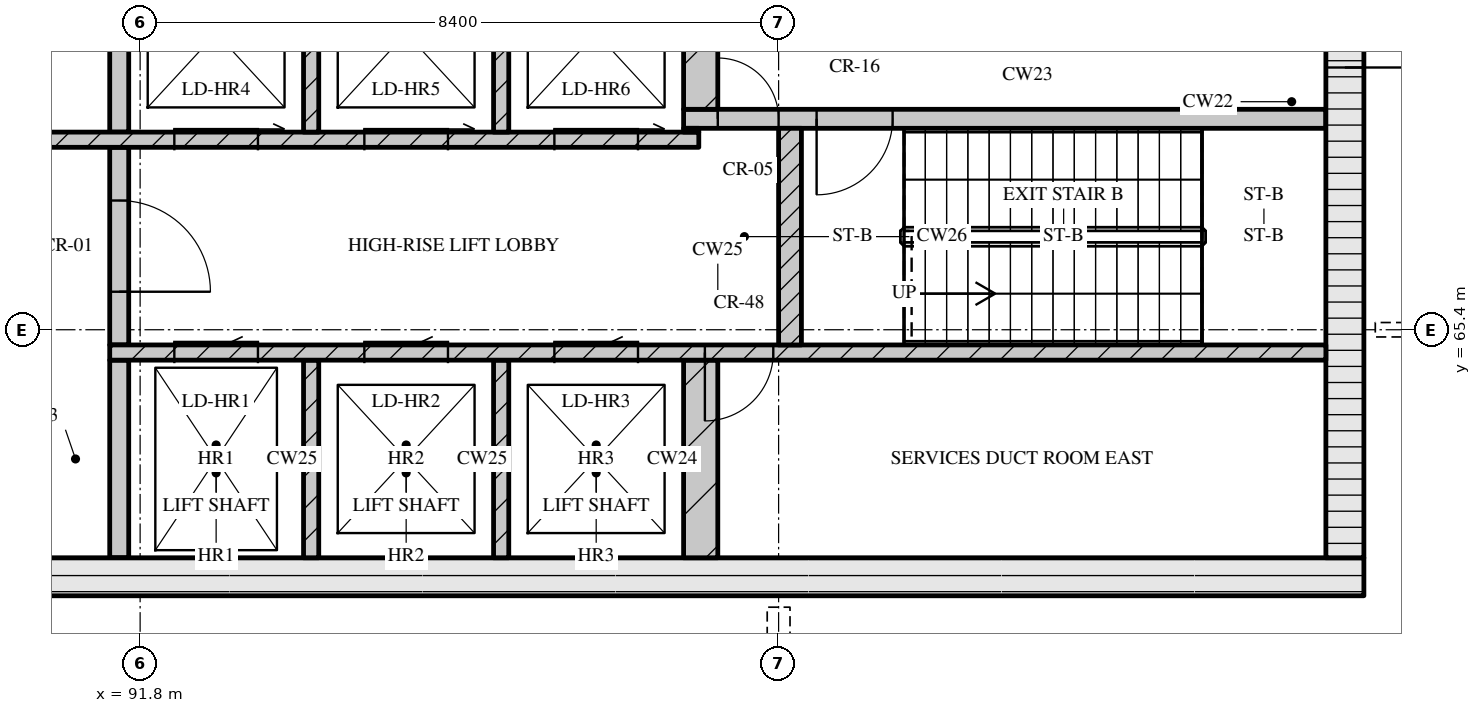
"""IFC4 building model, lengths in metres.
Left out: names, types, materials, properties, quantities, classifications, styles, units other than length and angle.
Written with IfcOpenShell. Run it as: python <this file> out.ifc"""

import sys

from ifc_helpers import new_model, si_unit, direction, frame, frame_2d, origin, place, context, subcontext, project, spatial, rectangle, extrude, element, fill, save


model = new_model("IFC4")
c1 = context("Model", 3, precision=1e-05, world=origin(), true_north=direction((0.0, 1.0)))
c2 = subcontext(c1, "Body", "Model", "MODEL_VIEW")
j1 = project(units=[si_unit("LENGTHUNIT", "METRE"), si_unit("PLANEANGLEUNIT", "RADIAN")], contexts=[c1])
p1 = place(None, origin())
s1 = spatial("IfcSite", under=j1, at=p1, CompositionType="ELEMENT")
p2 = place(p1, origin())
s2 = spatial("IfcBuilding", under=s1, at=p2, CompositionType="ELEMENT")
p3 = place(p2, frame((0.0, 0.0, 252.3)))
s3 = spatial("IfcBuildingStorey", under=s2, at=p3, CompositionType="ELEMENT", Elevation=252.3)
p4 = place(p3, frame((67.3, 62.15, 0.0), z_axis=(0.0, 0.0, 1.0), x_axis=(1.0, 0.0, 0.0)))
e1 = element("IfcWall", 1, at=p4, inside=s3, PredefinedType="SOLIDWALL", context=c2, shape_type="SweptSolid", body=[
    extrude(rectangle(XDim=40.6, YDim=0.5, at=frame_2d((20.3, 0.0))), origin(), (0.0, 0.0, 1.0), 10.97),
])
p5 = place(p4, frame((20.65, 0.0, 0.0)))
e2 = element("IfcOpeningElement", 2, at=p5, cuts=e1, PredefinedType="OPENING", context=c2, shape_type="SweptSolid", body=[
    extrude(rectangle(XDim=1.8, YDim=2.1, at=frame_2d((0.9, 1.05))), frame((0.0, 0.26, 0.0), z_axis=(0.0, -1.0, 0.0), x_axis=(1.0, 0.0, 0.0)), (0.0, 0.0, 1.0), 0.52),
])
p6 = place(p3, frame((107.65, 62.4, 0.0), z_axis=(0.0, 0.0, 1.0), x_axis=(0.0, 1.0, 0.0)))
e3 = element("IfcWall", 3, at=p6, inside=s3, PredefinedType="SOLIDWALL", context=c2, shape_type="SweptSolid", body=[
    extrude(rectangle(XDim=12.0, YDim=0.5, at=frame_2d((6.0, 0.0))), origin(), (0.0, 0.0, 1.0), 10.97),
])
p7 = place(p6, frame((6.45, 0.0, 0.0)))
e4 = element("IfcOpeningElement", 4, at=p7, cuts=e3, PredefinedType="OPENING", context=c2, shape_type="SweptSolid", body=[
    extrude(rectangle(XDim=1.2, YDim=2.1, at=frame_2d((0.6, 1.05))), frame((0.0, 0.26, 0.0), z_axis=(0.0, -1.0, 0.0), x_axis=(1.0, 0.0, 0.0)), (0.0, 0.0, 1.0), 0.52),
])
p8 = place(p3, frame((91.525, 62.4, 0.0), z_axis=(0.0, 0.0, 1.0), x_axis=(0.0, 1.0, 0.0)))
e5 = element("IfcWall", 5, at=p8, inside=s3, PredefinedType="SOLIDWALL", context=c2, shape_type="SweptSolid", body=[
    extrude(rectangle(XDim=2.6, YDim=0.25, at=frame_2d((1.3, 0.0))), origin(), (0.0, 0.0, 1.0), 10.97),
])
for number, where, z_axis, x_axis in (
    (6, (94.05, 62.4, 0.0), (0.0, 0.0, 1.0), (0.0, 1.0, 0.0)),
    (7, (96.55, 62.4, 0.0), (0.0, 0.0, 1.0), (0.0, 1.0, 0.0)),
):
    element("IfcWall", number, at=place(p3, frame(where, z_axis=z_axis, x_axis=x_axis)), inside=s3, PredefinedType="SOLIDWALL", context=c2, shape_type="SweptSolid", body=[
        extrude(rectangle(XDim=2.6, YDim=0.2, at=frame_2d((1.3, 0.0))), origin(), (0.0, 0.0, 1.0), 10.97),
    ])
p9 = place(p3, frame((99.175, 62.4, 0.0), z_axis=(0.0, 0.0, 1.0), x_axis=(0.0, 1.0, 0.0)))
e8 = element("IfcWall", 8, at=p9, inside=s3, PredefinedType="SOLIDWALL", context=c2, shape_type="SweptSolid", body=[
    extrude(rectangle(XDim=2.6, YDim=0.45, at=frame_2d((1.3, 0.0))), origin(), (0.0, 0.0, 1.0), 10.97),
])
p10 = place(p3, frame((91.4, 65.1, 0.0), z_axis=(0.0, 0.0, 1.0), x_axis=(1.0, 0.0, 0.0)))
e9 = element("IfcWall", 9, at=p10, inside=s3, PredefinedType="SOLIDWALL", context=c2, shape_type="SweptSolid", body=[
    extrude(rectangle(XDim=16.0, YDim=0.2, at=frame_2d((8.0, 0.0))), origin(), (0.0, 0.0, 1.0), 10.97),
])
p11 = place(p10, frame((0.85, 0.0, 0.0)))
e10 = element("IfcOpeningElement", 10, at=p11, cuts=e9, PredefinedType="OPENING", context=c2, shape_type="SweptSolid", body=[
    extrude(rectangle(XDim=1.1, YDim=2.1, at=frame_2d((0.55, 1.05))), frame((0.0, 0.11, 0.0), z_axis=(0.0, -1.0, 0.0), x_axis=(1.0, 0.0, 0.0)), (0.0, 0.0, 1.0), 0.22),
])
p12 = place(p10, frame((3.35, 0.0, 0.0)))
e11 = element("IfcOpeningElement", 11, at=p12, cuts=e9, PredefinedType="OPENING", context=c2, shape_type="SweptSolid", body=[
    extrude(rectangle(XDim=1.1, YDim=2.1, at=frame_2d((0.55, 1.05))), frame((0.0, 0.11, 0.0), z_axis=(0.0, -1.0, 0.0), x_axis=(1.0, 0.0, 0.0)), (0.0, 0.0, 1.0), 0.22),
])
p13 = place(p10, frame((5.85, 0.0, 0.0)))
e12 = element("IfcOpeningElement", 12, at=p13, cuts=e9, PredefinedType="OPENING", context=c2, shape_type="SweptSolid", body=[
    extrude(rectangle(XDim=1.1, YDim=2.1, at=frame_2d((0.55, 1.05))), frame((0.0, 0.11, 0.0), z_axis=(0.0, -1.0, 0.0), x_axis=(1.0, 0.0, 0.0)), (0.0, 0.0, 1.0), 0.22),
])
p14 = place(p10, frame((7.83, 0.0, 0.0)))
e13 = element("IfcOpeningElement", 13, at=p14, cuts=e9, PredefinedType="OPENING", context=c2, shape_type="SweptSolid", body=[
    extrude(rectangle(XDim=0.9, YDim=2.1, at=frame_2d((0.45, 1.05))), frame((0.0, 0.11, 0.0), z_axis=(0.0, -1.0, 0.0), x_axis=(1.0, 0.0, 0.0)), (0.0, 0.0, 1.0), 0.22),
])
p15 = place(p3, frame((91.525, 65.2, 0.0), z_axis=(0.0, 0.0, 1.0), x_axis=(0.0, 1.0, 0.0)))
e14 = element("IfcWall", 14, at=p15, inside=s3, PredefinedType="SOLIDWALL", context=c2, shape_type="SweptSolid", body=[
    extrude(rectangle(XDim=2.6, YDim=0.25, at=frame_2d((1.3, 0.0))), origin(), (0.0, 0.0, 1.0), 10.97),
])
p16 = place(p15, frame((0.7, 0.0, 0.0)))
e15 = element("IfcOpeningElement", 15, at=p16, cuts=e14, PredefinedType="OPENING", context=c2, shape_type="SweptSolid", body=[
    extrude(rectangle(XDim=1.2, YDim=2.1, at=frame_2d((0.6, 1.05))), frame((0.0, 0.135, 0.0), z_axis=(0.0, -1.0, 0.0), x_axis=(1.0, 0.0, 0.0)), (0.0, 0.0, 1.0), 0.27),
])
p17 = place(p3, frame((100.35, 65.2, 0.0), z_axis=(0.0, 0.0, 1.0), x_axis=(0.0, 1.0, 0.0)))
e16 = element("IfcWall", 16, at=p17, inside=s3, PredefinedType="SOLIDWALL", context=c2, shape_type="SweptSolid", body=[
    extrude(rectangle(XDim=2.85, YDim=0.3, at=frame_2d((1.425, 0.0))), origin(), (0.0, 0.0, 1.0), 10.97),
])
p18 = place(p3, frame((76.05, 67.9, 0.0), z_axis=(0.0, 0.0, 1.0), x_axis=(1.0, 0.0, 0.0)))
e17 = element("IfcWall", 17, at=p18, inside=s3, PredefinedType="SOLIDWALL", context=c2, shape_type="SweptSolid", body=[
    extrude(rectangle(XDim=23.1, YDim=0.2, at=frame_2d((11.55, 0.0))), origin(), (0.0, 0.0, 1.0), 10.97),
])
p19 = place(p18, frame((0.75, 0.0, 0.0)))
e18 = element("IfcOpeningElement", 18, at=p19, cuts=e17, PredefinedType="OPENING", context=c2, shape_type="SweptSolid", body=[
    extrude(rectangle(XDim=0.9, YDim=2.1, at=frame_2d((0.45, 1.05))), frame((0.0, 0.11, 0.0), z_axis=(0.0, -1.0, 0.0), x_axis=(1.0, 0.0, 0.0)), (0.0, 0.0, 1.0), 0.22),
])
p20 = place(p18, frame((3.32, 0.0, 0.0)))
e19 = element("IfcOpeningElement", 19, at=p20, cuts=e17, PredefinedType="OPENING", context=c2, shape_type="SweptSolid", body=[
    extrude(rectangle(XDim=0.9, YDim=2.1, at=frame_2d((0.45, 1.05))), frame((0.0, 0.11, 0.0), z_axis=(0.0, -1.0, 0.0), x_axis=(1.0, 0.0, 0.0)), (0.0, 0.0, 1.0), 0.22),
])
p21 = place(p18, frame((5.77, 0.0, 0.0)))
e20 = element("IfcOpeningElement", 20, at=p21, cuts=e17, PredefinedType="OPENING", context=c2, shape_type="SweptSolid", body=[
    extrude(rectangle(XDim=0.9, YDim=2.1, at=frame_2d((0.45, 1.05))), frame((0.0, 0.11, 0.0), z_axis=(0.0, -1.0, 0.0), x_axis=(1.0, 0.0, 0.0)), (0.0, 0.0, 1.0), 0.22),
])
p22 = place(p18, frame((8.45, 0.0, 0.0)))
e21 = element("IfcOpeningElement", 21, at=p22, cuts=e17, PredefinedType="OPENING", context=c2, shape_type="SweptSolid", body=[
    extrude(rectangle(XDim=0.9, YDim=2.1, at=frame_2d((0.45, 1.05))), frame((0.0, 0.11, 0.0), z_axis=(0.0, -1.0, 0.0), x_axis=(1.0, 0.0, 0.0)), (0.0, 0.0, 1.0), 0.22),
])
p23 = place(p18, frame((10.91, 0.0, 0.0)))
e22 = element("IfcOpeningElement", 22, at=p23, cuts=e17, PredefinedType="OPENING", context=c2, shape_type="SweptSolid", body=[
    extrude(rectangle(XDim=0.9, YDim=2.1, at=frame_2d((0.45, 1.05))), frame((0.0, 0.11, 0.0), z_axis=(0.0, -1.0, 0.0), x_axis=(1.0, 0.0, 0.0)), (0.0, 0.0, 1.0), 0.22),
])
p24 = place(p18, frame((13.55, 0.0, 0.0)))
e23 = element("IfcOpeningElement", 23, at=p24, cuts=e17, PredefinedType="OPENING", context=c2, shape_type="SweptSolid", body=[
    extrude(rectangle(XDim=1.0, YDim=2.1, at=frame_2d((0.5, 1.05))), frame((0.0, 0.11, 0.0), z_axis=(0.0, -1.0, 0.0), x_axis=(1.0, 0.0, 0.0)), (0.0, 0.0, 1.0), 0.22),
])
p25 = place(p18, frame((16.2, 0.0, 0.0)))
e24 = element("IfcOpeningElement", 24, at=p25, cuts=e17, PredefinedType="OPENING", context=c2, shape_type="SweptSolid", body=[
    extrude(rectangle(XDim=1.1, YDim=2.1, at=frame_2d((0.55, 1.05))), frame((0.0, 0.11, 0.0), z_axis=(0.0, -1.0, 0.0), x_axis=(1.0, 0.0, 0.0)), (0.0, 0.0, 1.0), 0.22),
])
p26 = place(p18, frame((18.7, 0.0, 0.0)))
e25 = element("IfcOpeningElement", 25, at=p26, cuts=e17, PredefinedType="OPENING", context=c2, shape_type="SweptSolid", body=[
    extrude(rectangle(XDim=1.1, YDim=2.1, at=frame_2d((0.55, 1.05))), frame((0.0, 0.11, 0.0), z_axis=(0.0, -1.0, 0.0), x_axis=(1.0, 0.0, 0.0)), (0.0, 0.0, 1.0), 0.22),
])
p27 = place(p18, frame((21.2, 0.0, 0.0)))
e26 = element("IfcOpeningElement", 26, at=p27, cuts=e17, PredefinedType="OPENING", context=c2, shape_type="SweptSolid", body=[
    extrude(rectangle(XDim=1.1, YDim=2.1, at=frame_2d((0.55, 1.05))), frame((0.0, 0.11, 0.0), z_axis=(0.0, -1.0, 0.0), x_axis=(1.0, 0.0, 0.0)), (0.0, 0.0, 1.0), 0.22),
])
p28 = place(p3, frame((91.525, 68.0, 0.0), z_axis=(0.0, 0.0, 1.0), x_axis=(0.0, 1.0, 0.0)))
e27 = element("IfcWall", 27, at=p28, inside=s3, PredefinedType="SOLIDWALL", context=c2, shape_type="SweptSolid", body=[
    extrude(rectangle(XDim=2.6, YDim=0.25, at=frame_2d((1.3, 0.0))), origin(), (0.0, 0.0, 1.0), 10.97),
])
for number, where, z_axis, x_axis in (
    (28, (94.05, 68.0, 0.0), (0.0, 0.0, 1.0), (0.0, 1.0, 0.0)),
    (29, (96.55, 68.0, 0.0), (0.0, 0.0, 1.0), (0.0, 1.0, 0.0)),
):
    element("IfcWall", number, at=place(p3, frame(where, z_axis=z_axis, x_axis=x_axis)), inside=s3, PredefinedType="SOLIDWALL", context=c2, shape_type="SweptSolid", body=[
        extrude(rectangle(XDim=2.6, YDim=0.2, at=frame_2d((1.3, 0.0))), origin(), (0.0, 0.0, 1.0), 10.97),
    ])
p29 = place(p3, frame((98.95, 68.025, 0.0), z_axis=(0.0, 0.0, 1.0), x_axis=(1.0, 0.0, 0.0)))
e30 = element("IfcWall", 30, at=p29, inside=s3, PredefinedType="SOLIDWALL", context=c2, shape_type="SweptSolid", body=[
    extrude(rectangle(XDim=0.2, YDim=0.05, at=frame_2d((0.1, 0.0))), origin(), (0.0, 0.0, 1.0), 10.97),
])
p30 = place(p3, frame((98.95, 68.175, 0.0), z_axis=(0.0, 0.0, 1.0), x_axis=(1.0, 0.0, 0.0)))
e31 = element("IfcWall", 31, at=p30, inside=s3, PredefinedType="SOLIDWALL", context=c2, shape_type="SweptSolid", body=[
    extrude(rectangle(XDim=8.45, YDim=0.25, at=frame_2d((4.225, 0.0))), origin(), (0.0, 0.0, 1.0), 10.97),
])
p31 = place(p30, frame((0.45, 0.0, 0.0)))
e32 = element("IfcOpeningElement", 32, at=p31, cuts=e31, PredefinedType="OPENING", context=c2, shape_type="SweptSolid", body=[
    extrude(rectangle(XDim=0.8, YDim=2.1, at=frame_2d((0.4, 1.05))), frame((0.0, 0.135, 0.0), z_axis=(0.0, -1.0, 0.0), x_axis=(1.0, 0.0, 0.0)), (0.0, 0.0, 1.0), 0.27),
])
p32 = place(p30, frame((1.75, 0.0, 0.0)))
e33 = element("IfcOpeningElement", 33, at=p32, cuts=e31, PredefinedType="OPENING", context=c2, shape_type="SweptSolid", body=[
    extrude(rectangle(XDim=1.0, YDim=2.1, at=frame_2d((0.5, 1.05))), frame((0.0, 0.135, 0.0), z_axis=(0.0, -1.0, 0.0), x_axis=(1.0, 0.0, 0.0)), (0.0, 0.0, 1.0), 0.27),
])
p33 = place(p3, frame((99.175, 68.3, 0.0), z_axis=(0.0, 0.0, 1.0), x_axis=(0.0, 1.0, 0.0)))
e34 = element("IfcWall", 34, at=p33, inside=s3, PredefinedType="SOLIDWALL", context=c2, shape_type="SweptSolid", body=[
    extrude(rectangle(XDim=2.3, YDim=0.45, at=frame_2d((1.15, 0.0))), origin(), (0.0, 0.0, 1.0), 10.97),
])
p34 = place(p11, origin())
e35 = element("IfcDoor", 35, at=p34, inside=s3, OperationType="SLIDING_TO_LEFT", PredefinedType="DOOR", context=c2, shape_type="SweptSolid", body=[
    extrude(rectangle(XDim=1.1, YDim=2.1, at=frame_2d((0.55, 1.05))), frame((0.0, 0.025, 0.0), z_axis=(0.0, -1.0, 0.0), x_axis=(1.0, 0.0, 0.0)), (0.0, 0.0, 1.0), 0.05),
])
fill(e10, e35)
p35 = place(p12, origin())
e36 = element("IfcDoor", 36, at=p35, inside=s3, OperationType="SLIDING_TO_LEFT", PredefinedType="DOOR", context=c2, shape_type="SweptSolid", body=[
    extrude(rectangle(XDim=1.1, YDim=2.1, at=frame_2d((0.55, 1.05))), frame((0.0, 0.025, 0.0), z_axis=(0.0, -1.0, 0.0), x_axis=(1.0, 0.0, 0.0)), (0.0, 0.0, 1.0), 0.05),
])
fill(e11, e36)
p36 = place(p13, origin())
e37 = element("IfcDoor", 37, at=p36, inside=s3, OperationType="SLIDING_TO_LEFT", PredefinedType="DOOR", context=c2, shape_type="SweptSolid", body=[
    extrude(rectangle(XDim=1.1, YDim=2.1, at=frame_2d((0.55, 1.05))), frame((0.0, 0.025, 0.0), z_axis=(0.0, -1.0, 0.0), x_axis=(1.0, 0.0, 0.0)), (0.0, 0.0, 1.0), 0.05),
])
fill(e12, e37)
p37 = place(p14, origin())
e38 = element("IfcDoor", 38, at=p37, inside=s3, OperationType="SINGLE_SWING_RIGHT", PredefinedType="DOOR", context=c2, shape_type="SweptSolid", body=[
    extrude(rectangle(XDim=0.9, YDim=2.1, at=frame_2d((0.45, 1.05))), frame((0.0, 0.025, 0.0), z_axis=(0.0, -1.0, 0.0), x_axis=(1.0, 0.0, 0.0)), (0.0, 0.0, 1.0), 0.05),
])
fill(e13, e38)
p38 = place(p16, origin())
e39 = element("IfcDoor", 39, at=p38, inside=s3, OperationType="SINGLE_SWING_RIGHT", PredefinedType="DOOR", context=c2, shape_type="SweptSolid", body=[
    extrude(rectangle(XDim=1.2, YDim=2.1, at=frame_2d((0.6, 1.05))), frame((0.0, 0.025, 0.0), z_axis=(0.0, -1.0, 0.0), x_axis=(1.0, 0.0, 0.0)), (0.0, 0.0, 1.0), 0.05),
])
fill(e15, e39)
p39 = place(p25, origin())
e40 = element("IfcDoor", 40, at=p39, inside=s3, OperationType="SLIDING_TO_RIGHT", PredefinedType="DOOR", context=c2, shape_type="SweptSolid", body=[
    extrude(rectangle(XDim=1.1, YDim=2.1, at=frame_2d((0.55, 1.05))), frame((0.0, 0.025, 0.0), z_axis=(0.0, -1.0, 0.0), x_axis=(1.0, 0.0, 0.0)), (0.0, 0.0, 1.0), 0.05),
])
fill(e24, e40)
p40 = place(p26, origin())
e41 = element("IfcDoor", 41, at=p40, inside=s3, OperationType="SLIDING_TO_RIGHT", PredefinedType="DOOR", context=c2, shape_type="SweptSolid", body=[
    extrude(rectangle(XDim=1.1, YDim=2.1, at=frame_2d((0.55, 1.05))), frame((0.0, 0.025, 0.0), z_axis=(0.0, -1.0, 0.0), x_axis=(1.0, 0.0, 0.0)), (0.0, 0.0, 1.0), 0.05),
])
fill(e25, e41)
p41 = place(p27, origin())
e42 = element("IfcDoor", 42, at=p41, inside=s3, OperationType="SLIDING_TO_RIGHT", PredefinedType="DOOR", context=c2, shape_type="SweptSolid", body=[
    extrude(rectangle(XDim=1.1, YDim=2.1, at=frame_2d((0.55, 1.05))), frame((0.0, 0.025, 0.0), z_axis=(0.0, -1.0, 0.0), x_axis=(1.0, 0.0, 0.0)), (0.0, 0.0, 1.0), 0.05),
])
fill(e26, e42)
p42 = place(p31, origin())
e43 = element("IfcDoor", 43, at=p42, inside=s3, OperationType="SINGLE_SWING_LEFT", PredefinedType="DOOR", context=c2, shape_type="SweptSolid", body=[
    extrude(rectangle(XDim=0.8, YDim=2.1, at=frame_2d((0.4, 1.05))), frame((0.0, 0.025, 0.0), z_axis=(0.0, -1.0, 0.0), x_axis=(1.0, 0.0, 0.0)), (0.0, 0.0, 1.0), 0.05),
])
fill(e32, e43)
p43 = place(p32, origin())
e44 = element("IfcDoor", 44, at=p43, inside=s3, OperationType="SINGLE_SWING_RIGHT", PredefinedType="DOOR", context=c2, shape_type="SweptSolid", body=[
    extrude(rectangle(XDim=1.0, YDim=2.1, at=frame_2d((0.5, 1.05))), frame((0.0, 0.025, 0.0), z_axis=(0.0, -1.0, 0.0), x_axis=(1.0, 0.0, 0.0)), (0.0, 0.0, 1.0), 0.05),
])
fill(e33, e44)
p44 = place(p7, origin())
e45 = element("IfcDoor", 45, at=p44, inside=s3, OperationType="SINGLE_SWING_RIGHT", PredefinedType="DOOR", context=c2, shape_type="SweptSolid", body=[
    extrude(rectangle(XDim=1.2, YDim=2.1, at=frame_2d((0.6, 1.05))), frame((0.0, 0.025, 0.0), z_axis=(0.0, -1.0, 0.0), x_axis=(1.0, 0.0, 0.0)), (0.0, 0.0, 1.0), 0.05),
])
fill(e4, e45)
save(model, sys.argv[1])
